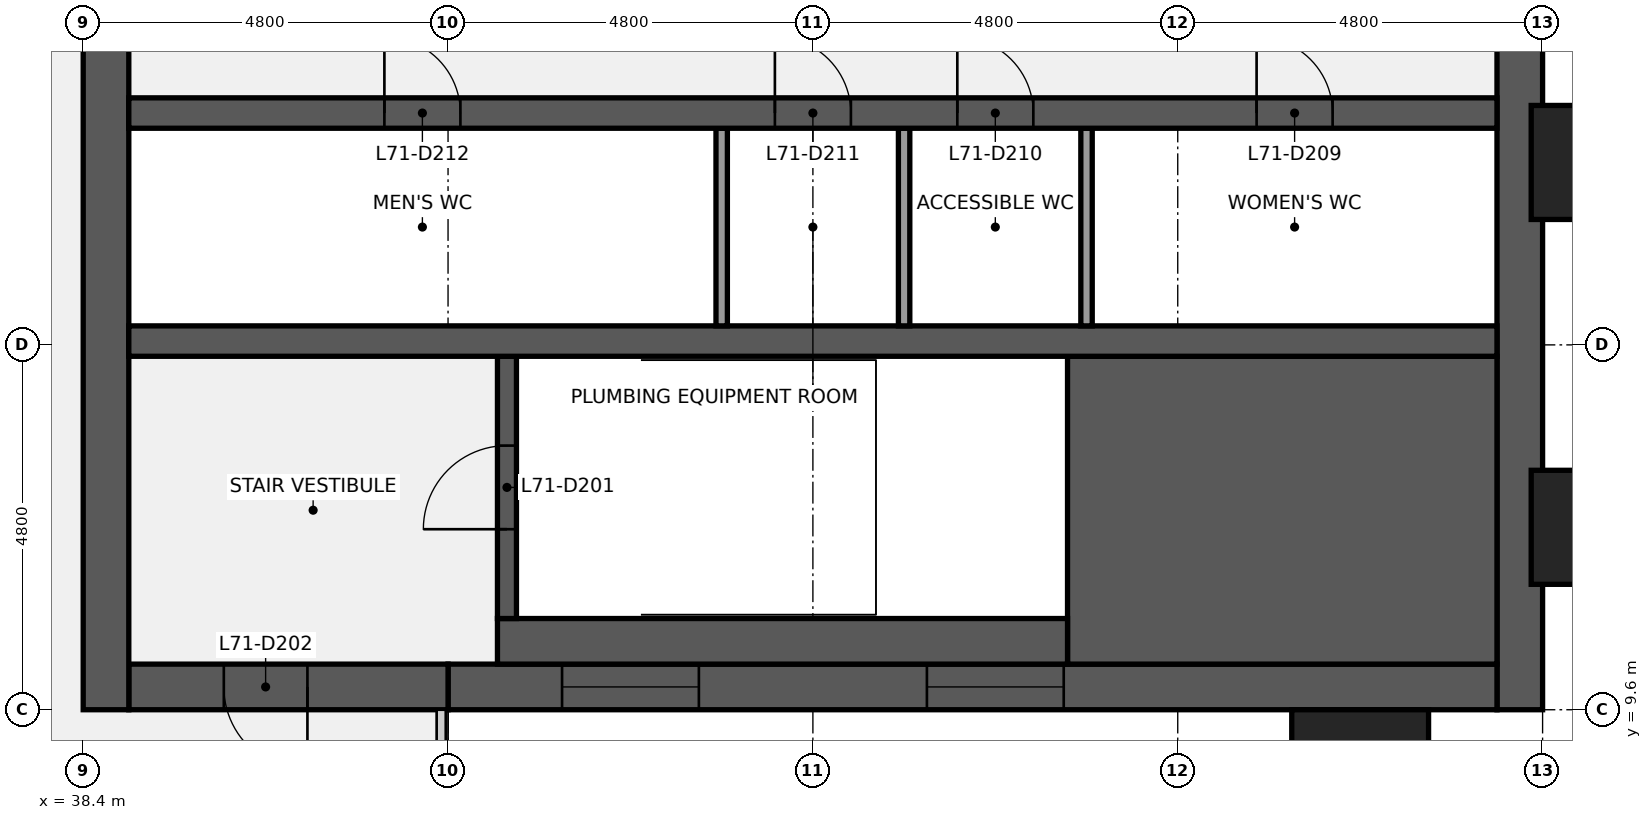
"""IFC4 building model, lengths in metres.
Left out: names, types, materials, properties, quantities, classifications, styles, units other than length and angle.
Written with IfcOpenShell. Run it as: python <this file> out.ifc"""

import sys

from ifc_helpers import new_model, si_unit, direction, frame, frame_2d, origin, origin_2d, place, context, subcontext, project, spatial, rectangle, extrude, element, fill, save


model = new_model("IFC4")
c1 = context("Model", 3, precision=1e-05, world=origin(), true_north=direction((0.0, 1.0)))
c2 = subcontext(c1, "Body", "Model", "MODEL_VIEW")
j1 = project(units=[si_unit("LENGTHUNIT", "METRE"), si_unit("PLANEANGLEUNIT", "RADIAN")], contexts=[c1])
p1 = place(None, origin())
s1 = spatial("IfcSite", under=j1, at=p1, CompositionType="ELEMENT")
p2 = place(p1, origin())
s2 = spatial("IfcBuilding", under=s1, at=p2, CompositionType="ELEMENT")
p3 = place(p2, frame((0.0, 0.0, 322.3)))
s3 = spatial("IfcBuildingStorey", under=s2, at=p3, CompositionType="ELEMENT", Elevation=322.3)
p4 = place(p3, frame((57.3, 38.4, 0.0), z_axis=(0.0, 0.0, 1.0), x_axis=(0.0, -1.0, 0.0)))
e1 = element("IfcWall", 1, at=p4, inside=s3, PredefinedType="SHEAR", context=c2, shape_type="SweptSolid", body=[
    extrude(rectangle(XDim=28.8, YDim=0.6, at=frame_2d((14.4, 0.0))), origin(), (0.0, 0.0, 1.0), 3.84),
])
p5 = place(p4, frame((18.45, 0.0, 0.9)))
e2 = element("IfcOpeningElement", 2, at=p5, cuts=e1, PredefinedType="OPENING", context=c2, shape_type="SweptSolid", body=[
    extrude(rectangle(XDim=1.5, YDim=1.5, at=frame_2d((0.75, 0.75))), frame((0.0, 0.31, 0.0), z_axis=(0.0, -1.0, 0.0), x_axis=(1.0, 0.0, 0.0)), (0.0, 0.0, 1.0), 0.62),
])
p6 = place(p4, frame((8.85, 0.0, 0.9)))
e3 = element("IfcOpeningElement", 3, at=p6, cuts=e1, PredefinedType="OPENING", context=c2, shape_type="SweptSolid", body=[
    extrude(rectangle(XDim=1.5, YDim=1.5, at=frame_2d((0.75, 0.75))), frame((0.0, 0.31, 0.0), z_axis=(0.0, -1.0, 0.0), x_axis=(1.0, 0.0, 0.0)), (0.0, 0.0, 1.0), 0.62),
])
p7 = place(p3, frame((57.0, 9.9, 0.0), z_axis=(0.0, 0.0, 1.0), x_axis=(-1.0, 0.0, 0.0)))
e4 = element("IfcWall", 4, at=p7, inside=s3, PredefinedType="SHEAR", context=c2, shape_type="SweptSolid", body=[
    extrude(rectangle(XDim=13.8, YDim=0.6, at=frame_2d((6.9, 0.0))), origin(), (0.0, 0.0, 1.0), 3.84),
])
p8 = place(p7, frame((5.7, 0.0, 0.9)))
e5 = element("IfcOpeningElement", 5, at=p8, cuts=e4, PredefinedType="OPENING", context=c2, shape_type="SweptSolid", body=[
    extrude(rectangle(XDim=1.8, YDim=1.5, at=frame_2d((0.9, 0.75))), frame((0.0, 0.31, 0.0), z_axis=(0.0, -1.0, 0.0), x_axis=(1.0, 0.0, 0.0)), (0.0, 0.0, 1.0), 0.62),
])
p9 = place(p7, frame((10.5, 0.0, 0.9)))
e6 = element("IfcOpeningElement", 6, at=p9, cuts=e4, PredefinedType="OPENING", context=c2, shape_type="SweptSolid", body=[
    extrude(rectangle(XDim=1.8, YDim=1.5, at=frame_2d((0.9, 0.75))), frame((0.0, 0.31, 0.0), z_axis=(0.0, -1.0, 0.0), x_axis=(1.0, 0.0, 0.0)), (0.0, 0.0, 1.0), 0.62),
])
p10 = place(p3, frame((43.2, 9.9, 0.0), z_axis=(0.0, 0.0, 1.0), x_axis=(-1.0, 0.0, 0.0)))
e7 = element("IfcWall", 7, at=p10, inside=s3, PredefinedType="SHEAR", context=c2, shape_type="SweptSolid", body=[
    extrude(rectangle(XDim=4.2, YDim=0.6, at=frame_2d((2.1, 0.0))), origin(), (0.0, 0.0, 1.0), 3.84),
])
p11 = place(p10, frame((1.85, 0.0, 0.0)))
e8 = element("IfcOpeningElement", 8, at=p11, cuts=e7, PredefinedType="OPENING", context=c2, shape_type="SweptSolid", body=[
    extrude(rectangle(XDim=1.1, YDim=2.1, at=frame_2d((0.55, 1.05))), frame((0.0, 0.31, 0.0), z_axis=(0.0, -1.0, 0.0), x_axis=(1.0, 0.0, 0.0)), (0.0, 0.0, 1.0), 0.62),
])
p12 = place(p3, frame((38.7, 9.6, 0.0), z_axis=(0.0, 0.0, 1.0), x_axis=(0.0, 1.0, 0.0)))
e9 = element("IfcWall", 9, at=p12, inside=s3, PredefinedType="SHEAR", context=c2, shape_type="SweptSolid", body=[
    extrude(rectangle(XDim=28.8, YDim=0.6, at=frame_2d((14.4, 0.0))), origin(), (0.0, 0.0, 1.0), 3.84),
])
p13 = place(p12, frame((8.7, 0.0, 0.0)))
e10 = element("IfcOpeningElement", 10, at=p13, cuts=e9, PredefinedType="OPENING", context=c2, shape_type="SweptSolid", body=[
    extrude(rectangle(XDim=1.8, YDim=2.1, at=frame_2d((0.9, 1.05))), frame((0.0, 0.31, 0.0), z_axis=(0.0, -1.0, 0.0), x_axis=(1.0, 0.0, 0.0)), (0.0, 0.0, 1.0), 0.62),
])
p14 = place(p12, frame((18.3, 0.0, 0.0)))
e11 = element("IfcOpeningElement", 11, at=p14, cuts=e9, PredefinedType="OPENING", context=c2, shape_type="SweptSolid", body=[
    extrude(rectangle(XDim=1.8, YDim=2.1, at=frame_2d((0.9, 1.05))), frame((0.0, 0.31, 0.0), z_axis=(0.0, -1.0, 0.0), x_axis=(1.0, 0.0, 0.0)), (0.0, 0.0, 1.0), 0.62),
])
p15 = place(p3, frame((51.35, 12.225, 0.0), z_axis=(0.0, 0.0, 1.0), x_axis=(1.0, 0.0, 0.0)))
e12 = element("IfcWall", 12, at=p15, inside=s3, PredefinedType="SHEAR", context=c2, shape_type="SweptSolid", body=[
    extrude(rectangle(XDim=5.65, YDim=4.05, at=frame_2d((2.825, 0.0))), origin(), (0.0, 0.0, 1.0), 3.84),
])
p16 = place(p3, frame((43.85, 10.5, 0.0), z_axis=(0.0, 0.0, 1.0), x_axis=(1.0, 0.0, 0.0)))
e13 = element("IfcWall", 13, at=p16, inside=s3, PredefinedType="SHEAR", context=c2, shape_type="SweptSolid", body=[
    extrude(rectangle(XDim=7.5, YDim=0.6, at=frame_2d((3.75, 0.0))), origin(), (0.0, 0.0, 1.0), 3.84),
])
p17 = place(p3, frame((43.975, 10.8, 0.0), z_axis=(0.0, 0.0, 1.0), x_axis=(0.0, 1.0, 0.0)))
e14 = element("IfcWall", 14, at=p17, inside=s3, PredefinedType="SHEAR", context=c2, shape_type="SweptSolid", body=[
    extrude(rectangle(XDim=3.45, YDim=0.25, at=frame_2d((1.725, 0.0))), origin(), (0.0, 0.0, 1.0), 3.84),
])
p18 = place(p17, frame((1.175, 0.0, 0.0)))
e15 = element("IfcOpeningElement", 15, at=p18, cuts=e14, PredefinedType="OPENING", context=c2, shape_type="SweptSolid", body=[
    extrude(rectangle(XDim=1.1, YDim=2.1, at=frame_2d((0.55, 1.05))), frame((0.0, 0.135, 0.0), z_axis=(0.0, -1.0, 0.0), x_axis=(1.0, 0.0, 0.0)), (0.0, 0.0, 1.0), 0.27),
])
p19 = place(p3, frame((39.0, 14.45, 0.0), z_axis=(0.0, 0.0, 1.0), x_axis=(1.0, 0.0, 0.0)))
e16 = element("IfcWall", 16, at=p19, inside=s3, PredefinedType="SHEAR", context=c2, shape_type="SweptSolid", body=[
    extrude(rectangle(XDim=18.0, YDim=0.4, at=frame_2d((9.0, 0.0))), origin(), (0.0, 0.0, 1.0), 3.84),
])
for number, where, z_axis, x_axis in (
    (17, (51.6, 14.65, 0.0), (0.0, 0.0, 1.0), (0.0, 1.0, 0.0)),
    (18, (49.2, 14.65, 0.0), (0.0, 0.0, 1.0), (0.0, 1.0, 0.0)),
    (19, (46.8, 14.65, 0.0), (0.0, 0.0, 1.0), (0.0, 1.0, 0.0)),
):
    element("IfcWall", number, at=place(p3, frame(where, z_axis=z_axis, x_axis=x_axis)), inside=s3, PredefinedType="PARTITIONING", context=c2, shape_type="SweptSolid", body=[
        extrude(rectangle(XDim=2.6, YDim=0.15, at=frame_2d((1.3, 0.0))), origin(), (0.0, 0.0, 1.0), 3.84),
    ])
p20 = place(p3, frame((39.0, 17.45, 0.0), z_axis=(0.0, 0.0, 1.0), x_axis=(1.0, 0.0, 0.0)))
e20 = element("IfcWall", 20, at=p20, inside=s3, PredefinedType="SHEAR", context=c2, shape_type="SweptSolid", body=[
    extrude(rectangle(XDim=18.0, YDim=0.4, at=frame_2d((9.0, 0.0))), origin(), (0.0, 0.0, 1.0), 3.84),
])
p21 = place(p20, frame((14.837, 0.0, 0.0)))
e21 = element("IfcOpeningElement", 21, at=p21, cuts=e20, PredefinedType="OPENING", context=c2, shape_type="SweptSolid", body=[
    extrude(rectangle(XDim=1.0, YDim=2.1, at=frame_2d((0.5, 1.05))), frame((0.0, 0.21, 0.0), z_axis=(0.0, -1.0, 0.0), x_axis=(1.0, 0.0, 0.0)), (0.0, 0.0, 1.0), 0.42),
])
p22 = place(p20, frame((10.9, 0.0, 0.0)))
e22 = element("IfcOpeningElement", 22, at=p22, cuts=e20, PredefinedType="OPENING", context=c2, shape_type="SweptSolid", body=[
    extrude(rectangle(XDim=1.0, YDim=2.1, at=frame_2d((0.5, 1.05))), frame((0.0, 0.21, 0.0), z_axis=(0.0, -1.0, 0.0), x_axis=(1.0, 0.0, 0.0)), (0.0, 0.0, 1.0), 0.42),
])
p23 = place(p20, frame((8.5, 0.0, 0.0)))
e23 = element("IfcOpeningElement", 23, at=p23, cuts=e20, PredefinedType="OPENING", context=c2, shape_type="SweptSolid", body=[
    extrude(rectangle(XDim=1.0, YDim=2.1, at=frame_2d((0.5, 1.05))), frame((0.0, 0.21, 0.0), z_axis=(0.0, -1.0, 0.0), x_axis=(1.0, 0.0, 0.0)), (0.0, 0.0, 1.0), 0.42),
])
p24 = place(p20, frame((3.363, 0.0, 0.0)))
e24 = element("IfcOpeningElement", 24, at=p24, cuts=e20, PredefinedType="OPENING", context=c2, shape_type="SweptSolid", body=[
    extrude(rectangle(XDim=1.0, YDim=2.1, at=frame_2d((0.5, 1.05))), frame((0.0, 0.21, 0.0), z_axis=(0.0, -1.0, 0.0), x_axis=(1.0, 0.0, 0.0)), (0.0, 0.0, 1.0), 0.42),
])
for number, where, z_axis, x_axis in (
    (25, (55.2, 8.85, 0.0), (0.0, 0.0, 1.0), (1.0, 0.0, 0.0)),
    (26, (58.35, 12.0, 0.0), (0.0, 0.0, 1.0), (0.0, 1.0, 0.0)),
    (27, (58.35, 16.8, 0.0), (0.0, 0.0, 1.0), (0.0, 1.0, 0.0)),
):
    element("IfcColumn", number, at=place(p3, frame(where, z_axis=z_axis, x_axis=x_axis)), inside=s3, PredefinedType="PILASTER", context=c2, shape_type="SweptSolid", body=[
        extrude(rectangle(XDim=1.8, YDim=1.5, at=origin_2d()), origin(), (0.0, 0.0, 1.0), 4.0),
    ])
p25 = place(p18, origin())
e28 = element("IfcDoor", 28, at=p25, inside=s3, OperationType="SINGLE_SWING_LEFT", PredefinedType="DOOR", context=c2, shape_type="SweptSolid", body=[
    extrude(rectangle(XDim=1.1, YDim=2.1, at=frame_2d((0.55, 1.05))), frame((0.0, 0.025, 0.0), z_axis=(0.0, -1.0, 0.0), x_axis=(1.0, 0.0, 0.0)), (0.0, 0.0, 1.0), 0.05),
])
fill(e15, e28)
p26 = place(p11, origin())
e29 = element("IfcDoor", 29, at=p26, inside=s3, OperationType="SINGLE_SWING_LEFT", PredefinedType="DOOR", context=c2, shape_type="SweptSolid", body=[
    extrude(rectangle(XDim=1.1, YDim=2.1, at=frame_2d((0.55, 1.05))), frame((0.0, 0.025, 0.0), z_axis=(0.0, -1.0, 0.0), x_axis=(1.0, 0.0, 0.0)), (0.0, 0.0, 1.0), 0.05),
])
fill(e8, e29)
p27 = place(p21, origin())
e30 = element("IfcDoor", 30, at=p27, inside=s3, OperationType="SINGLE_SWING_LEFT", PredefinedType="DOOR", context=c2, shape_type="SweptSolid", body=[
    extrude(rectangle(XDim=1.0, YDim=2.1, at=frame_2d((0.5, 1.05))), frame((0.0, 0.025, 0.0), z_axis=(0.0, -1.0, 0.0), x_axis=(1.0, 0.0, 0.0)), (0.0, 0.0, 1.0), 0.05),
])
fill(e21, e30)
p28 = place(p22, origin())
e31 = element("IfcDoor", 31, at=p28, inside=s3, OperationType="SINGLE_SWING_LEFT", PredefinedType="DOOR", context=c2, shape_type="SweptSolid", body=[
    extrude(rectangle(XDim=1.0, YDim=2.1, at=frame_2d((0.5, 1.05))), frame((0.0, 0.025, 0.0), z_axis=(0.0, -1.0, 0.0), x_axis=(1.0, 0.0, 0.0)), (0.0, 0.0, 1.0), 0.05),
])
fill(e22, e31)
p29 = place(p23, origin())
e32 = element("IfcDoor", 32, at=p29, inside=s3, OperationType="SINGLE_SWING_LEFT", PredefinedType="DOOR", context=c2, shape_type="SweptSolid", body=[
    extrude(rectangle(XDim=1.0, YDim=2.1, at=frame_2d((0.5, 1.05))), frame((0.0, 0.025, 0.0), z_axis=(0.0, -1.0, 0.0), x_axis=(1.0, 0.0, 0.0)), (0.0, 0.0, 1.0), 0.05),
])
fill(e23, e32)
p30 = place(p24, origin())
e33 = element("IfcDoor", 33, at=p30, inside=s3, OperationType="SINGLE_SWING_LEFT", PredefinedType="DOOR", context=c2, shape_type="SweptSolid", body=[
    extrude(rectangle(XDim=1.0, YDim=2.1, at=frame_2d((0.5, 1.05))), frame((0.0, 0.025, 0.0), z_axis=(0.0, -1.0, 0.0), x_axis=(1.0, 0.0, 0.0)), (0.0, 0.0, 1.0), 0.05),
])
fill(e24, e33)
p31 = place(p8, origin())
e34 = element("IfcWindow", 34, at=p31, inside=s3, PartitioningType="SINGLE_PANEL", PredefinedType="WINDOW", context=c2, shape_type="SweptSolid", body=[
    extrude(rectangle(XDim=1.8, YDim=1.5, at=frame_2d((0.9, 0.75))), frame((0.0, 0.03, 0.0), z_axis=(0.0, -1.0, 0.0), x_axis=(1.0, 0.0, 0.0)), (0.0, 0.0, 1.0), 0.06),
])
fill(e5, e34)
p32 = place(p9, origin())
e35 = element("IfcWindow", 35, at=p32, inside=s3, PartitioningType="SINGLE_PANEL", PredefinedType="WINDOW", context=c2, shape_type="SweptSolid", body=[
    extrude(rectangle(XDim=1.8, YDim=1.5, at=frame_2d((0.9, 0.75))), frame((0.0, 0.03, 0.0), z_axis=(0.0, -1.0, 0.0), x_axis=(1.0, 0.0, 0.0)), (0.0, 0.0, 1.0), 0.06),
])
fill(e6, e35)
save(model, sys.argv[1])
